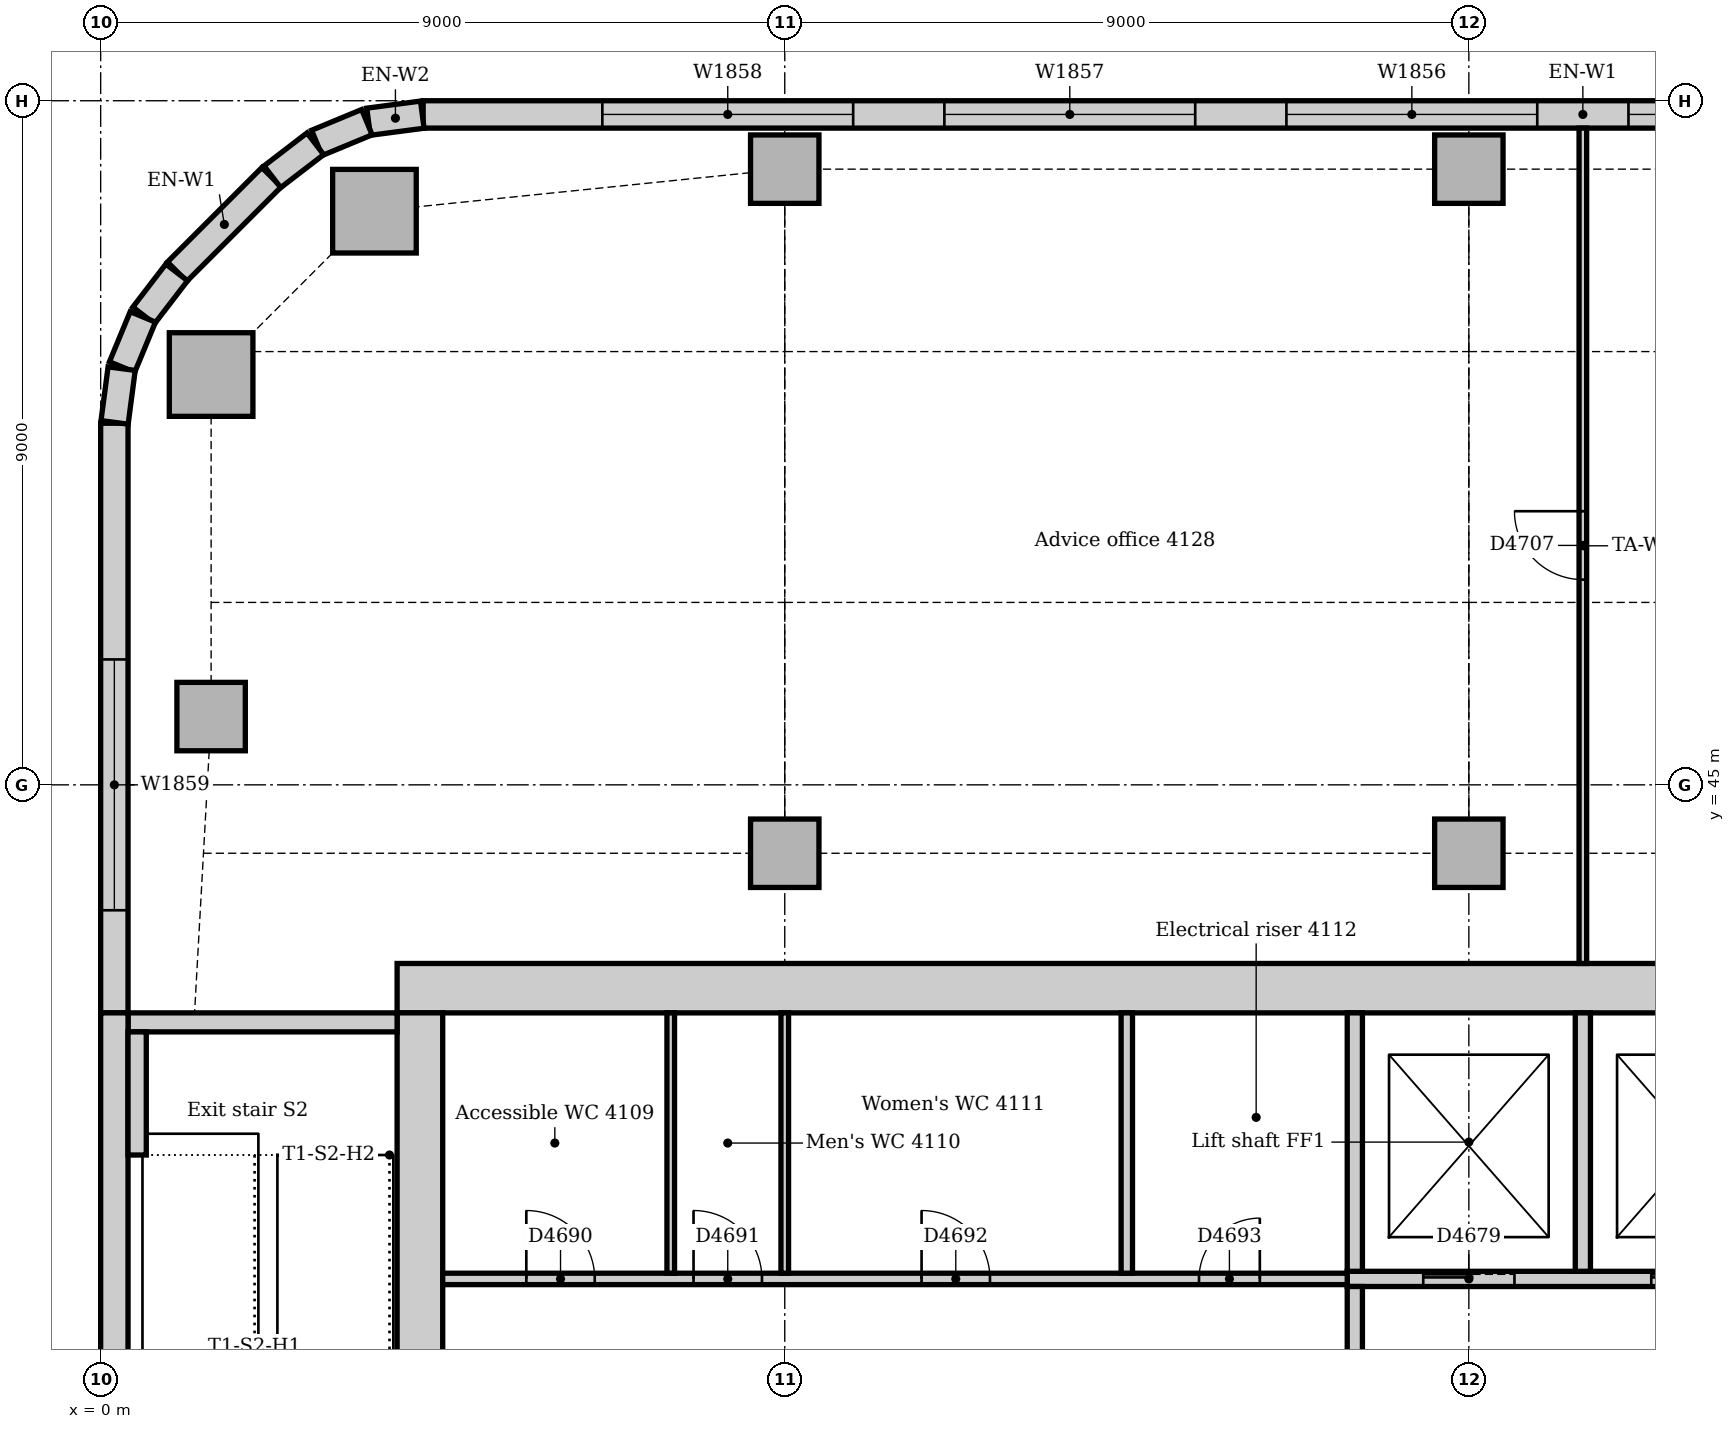
"""IFC4 building model, lengths in metres.
Left out: names, types, materials, properties, quantities, classifications, styles, units other than length and angle.
Written with IfcOpenShell. Run it as: python <this file> out.ifc"""

import sys

from ifc_helpers import new_model, si_unit, direction, frame, frame_2d, origin, origin_2d, place, context, subcontext, project, spatial, rectangle, extrude, element, fill, save


model = new_model("IFC4")
c1 = context("Model", 3, precision=1e-05, world=origin(), true_north=direction((0.0, 1.0)))
c2 = subcontext(c1, "Body", "Model", "MODEL_VIEW")
j1 = project(units=[si_unit("LENGTHUNIT", "METRE"), si_unit("PLANEANGLEUNIT", "RADIAN")], contexts=[c1])
p1 = place(None, origin())
s1 = spatial("IfcSite", under=j1, at=p1, CompositionType="ELEMENT")
p2 = place(p1, origin())
s2 = spatial("IfcBuilding", under=s1, at=p2, CompositionType="ELEMENT")
p3 = place(p2, frame((0.0, 0.0, 173.0)))
s3 = spatial("IfcBuildingStorey", under=s2, at=p3, CompositionType="ELEMENT", Elevation=173.0)
p4 = place(p3, frame((23.15, 42.325, 0.0), z_axis=(0.0, 0.0, 1.0), x_axis=(-1.0, 0.0, 0.0)))
e1 = element("IfcWall", 1, at=p4, inside=s3, PredefinedType="SOLIDWALL", context=c2, shape_type="SweptSolid", body=[
    extrude(rectangle(XDim=19.25, YDim=0.65, at=frame_2d((9.625, 0.0))), origin(), (0.0, 0.0, 1.0), 4.0),
])
p5 = place(p3, frame((4.2, 42.0, 0.0), z_axis=(0.0, 0.0, 1.0), x_axis=(0.0, -1.0, 0.0)))
e2 = element("IfcWall", 2, at=p5, inside=s3, PredefinedType="SOLIDWALL", context=c2, shape_type="SweptSolid", body=[
    extrude(rectangle(XDim=10.5, YDim=0.6, at=frame_2d((5.25, 0.0))), origin(), (0.0, 0.0, 1.0), 4.0),
])
p6 = place(p5, frame((5.3, 0.0, 0.0)))
e3 = element("IfcOpeningElement", 3, at=p6, cuts=e2, PredefinedType="OPENING", context=c2, shape_type="SweptSolid", body=[
    extrude(rectangle(XDim=1.0, YDim=2.1, at=frame_2d((0.5, 1.05))), frame((0.0, 0.31, 0.0), z_axis=(0.0, -1.0, 0.0), x_axis=(1.0, 0.0, 0.0)), (0.0, 0.0, 1.0), 0.62),
])
p7 = place(p3, frame((3.9, 41.875, 0.0), z_axis=(0.0, 0.0, 1.0), x_axis=(-1.0, 0.0, 0.0)))
e4 = element("IfcWall", 4, at=p7, inside=s3, PredefinedType="SOLIDWALL", context=c2, shape_type="SweptSolid", body=[
    extrude(rectangle(XDim=3.54, YDim=0.25, at=frame_2d((1.77, 0.0))), origin(), (0.0, 0.0, 1.0), 4.0),
])
for number, where, z_axis, x_axis in (
    (5, (3.602, 52.547, 0.0), (0.0, 0.0, 1.0), (1.0, 0.0, 0.0)),
    (6, (1.453, 50.398, 0.0), (0.0, 0.0, 1.0), (1.0, 0.0, 0.0)),
):
    element("IfcColumn", number, at=place(p3, frame(where, z_axis=z_axis, x_axis=x_axis)), inside=s3, PredefinedType="COLUMN", context=c2, shape_type="SweptSolid", body=[
        extrude(rectangle(XDim=1.1, YDim=1.1, at=origin_2d()), origin(), (0.0, 0.0, 1.0), 3.85),
    ])
for number, where, z_axis, x_axis in (
    (7, (9.0, 53.1, 0.0), (0.0, 0.0, 1.0), (1.0, 0.0, 0.0)),
    (8, (18.0, 53.1, 0.0), (0.0, 0.0, 1.0), (1.0, 0.0, 0.0)),
    (9, (1.453, 45.898, 0.0), (0.0, 0.0, 1.0), (1.0, 0.0, 0.0)),
    (10, (9.0, 44.1, 0.0), (0.0, 0.0, 1.0), (1.0, 0.0, 0.0)),
    (11, (18.0, 44.1, 0.0), (0.0, 0.0, 1.0), (1.0, 0.0, 0.0)),
):
    element("IfcColumn", number, at=place(p3, frame(where, z_axis=z_axis, x_axis=x_axis)), inside=s3, PredefinedType="COLUMN", context=c2, shape_type="SweptSolid", body=[
        extrude(rectangle(XDim=0.9, YDim=0.9, at=origin_2d()), origin(), (0.0, 0.0, 1.0), 3.85),
    ])
p8 = place(p3, frame((34.757, 53.82, 0.0), z_axis=(0.0, 0.0, 1.0), x_axis=(-1.0, 0.0, 0.0)))
e12 = element("IfcWall", 12, at=p8, inside=s3, PredefinedType="STANDARD", context=c2, shape_type="SweptSolid", body=[
    extrude(rectangle(XDim=30.515, YDim=0.36, at=frame_2d((15.257, 0.0))), origin(), (0.0, 0.0, 1.0), 3.85),
])
p9 = place(p8, frame((2.357, 0.0, 0.9)))
e13 = element("IfcOpeningElement", 13, at=p9, cuts=e12, PredefinedType="OPENING", context=c2, shape_type="SweptSolid", body=[
    extrude(rectangle(XDim=3.3, YDim=1.6, at=frame_2d((1.65, 0.8))), frame((0.0, 0.19, 0.0), z_axis=(0.0, -1.0, 0.0), x_axis=(1.0, 0.0, 0.0)), (0.0, 0.0, 1.0), 0.38),
])
p10 = place(p8, frame((6.857, 0.0, 0.9)))
e14 = element("IfcOpeningElement", 14, at=p10, cuts=e12, PredefinedType="OPENING", context=c2, shape_type="SweptSolid", body=[
    extrude(rectangle(XDim=3.3, YDim=1.6, at=frame_2d((1.65, 0.8))), frame((0.0, 0.19, 0.0), z_axis=(0.0, -1.0, 0.0), x_axis=(1.0, 0.0, 0.0)), (0.0, 0.0, 1.0), 0.38),
])
p11 = place(p8, frame((11.357, 0.0, 0.9)))
e15 = element("IfcOpeningElement", 15, at=p11, cuts=e12, PredefinedType="OPENING", context=c2, shape_type="SweptSolid", body=[
    extrude(rectangle(XDim=3.3, YDim=1.6, at=frame_2d((1.65, 0.8))), frame((0.0, 0.19, 0.0), z_axis=(0.0, -1.0, 0.0), x_axis=(1.0, 0.0, 0.0)), (0.0, 0.0, 1.0), 0.38),
])
p12 = place(p8, frame((15.857, 0.0, 0.9)))
e16 = element("IfcOpeningElement", 16, at=p12, cuts=e12, PredefinedType="OPENING", context=c2, shape_type="SweptSolid", body=[
    extrude(rectangle(XDim=3.3, YDim=1.6, at=frame_2d((1.65, 0.8))), frame((0.0, 0.19, 0.0), z_axis=(0.0, -1.0, 0.0), x_axis=(1.0, 0.0, 0.0)), (0.0, 0.0, 1.0), 0.38),
])
p13 = place(p8, frame((20.357, 0.0, 0.9)))
e17 = element("IfcOpeningElement", 17, at=p13, cuts=e12, PredefinedType="OPENING", context=c2, shape_type="SweptSolid", body=[
    extrude(rectangle(XDim=3.3, YDim=1.6, at=frame_2d((1.65, 0.8))), frame((0.0, 0.19, 0.0), z_axis=(0.0, -1.0, 0.0), x_axis=(1.0, 0.0, 0.0)), (0.0, 0.0, 1.0), 0.38),
])
p14 = place(p8, frame((24.857, 0.0, 0.9)))
e18 = element("IfcOpeningElement", 18, at=p14, cuts=e12, PredefinedType="OPENING", context=c2, shape_type="SweptSolid", body=[
    extrude(rectangle(XDim=3.3, YDim=1.6, at=frame_2d((1.65, 0.8))), frame((0.0, 0.19, 0.0), z_axis=(0.0, -1.0, 0.0), x_axis=(1.0, 0.0, 0.0)), (0.0, 0.0, 1.0), 0.38),
])
p15 = place(p3, frame((2.249, 52.994, 0.0), z_axis=(0.0, 0.0, 1.0), x_axis=(-0.707106781187, -0.707106781187, 0.0)))
e19 = element("IfcWall", 19, at=p15, inside=s3, PredefinedType="STANDARD", context=c2, shape_type="SweptSolid", body=[
    extrude(rectangle(XDim=1.757, YDim=0.36, at=frame_2d((0.879, 0.0))), origin(), (0.0, 0.0, 1.0), 3.85),
])
p16 = place(p3, frame((0.18, 49.757, 0.0), z_axis=(0.0, 0.0, 1.0), x_axis=(0.0, -1.0, 0.0)))
e20 = element("IfcWall", 20, at=p16, inside=s3, PredefinedType="STANDARD", context=c2, shape_type="SweptSolid", body=[
    extrude(rectangle(XDim=7.757, YDim=0.36, at=frame_2d((3.879, 0.0))), origin(), (0.0, 0.0, 1.0), 3.85),
])
p17 = place(p16, frame((3.107, 0.0, 0.9)))
e21 = element("IfcOpeningElement", 21, at=p17, cuts=e20, PredefinedType="OPENING", context=c2, shape_type="SweptSolid", body=[
    extrude(rectangle(XDim=3.3, YDim=1.6, at=frame_2d((1.65, 0.8))), frame((0.0, 0.19, 0.0), z_axis=(0.0, -1.0, 0.0), x_axis=(1.0, 0.0, 0.0)), (0.0, 0.0, 1.0), 0.38),
])
p18 = place(p3, frame((0.18, 42.0, 0.0), z_axis=(0.0, 0.0, 1.0), x_axis=(0.0, -1.0, 0.0)))
e22 = element("IfcWall", 22, at=p18, inside=s3, PredefinedType="STANDARD", context=c2, shape_type="SweptSolid", body=[
    extrude(rectangle(XDim=6.75, YDim=0.36, at=frame_2d((3.375, 0.0))), origin(), (0.0, 0.0, 1.0), 3.85),
])
for number, where, z_axis, x_axis in (
    (23, (4.231, 53.817, 0.0), (0.0, 0.0, 1.0), (-0.991, -0.131, 0.0)),
    (24, (3.503, 53.718, 0.0), (0.0, 0.0, 1.0), (-0.924, -0.383, 0.0)),
):
    element("IfcWall", number, at=place(p3, frame(where, z_axis=z_axis, x_axis=x_axis)), inside=s3, PredefinedType="STANDARD", context=c2, shape_type="SweptSolid", body=[
        extrude(rectangle(XDim=0.713, YDim=0.36, at=frame_2d((0.356, 0.0))), origin(), (0.0, 0.0, 1.0), 3.85),
    ])
for number, where, z_axis, x_axis in (
    (25, (2.825, 53.434, 0.0), (0.0, 0.0, 1.0), (-0.793, -0.609, 0.0)),
    (26, (1.0, 51.741, 0.0), (0.0, 0.0, 1.0), (-0.609, -0.793, 0.0)),
):
    element("IfcWall", number, at=place(p3, frame(where, z_axis=z_axis, x_axis=x_axis)), inside=s3, PredefinedType="STANDARD", context=c2, shape_type="SweptSolid", body=[
        extrude(rectangle(XDim=0.713, YDim=0.36, at=frame_2d((0.357, 0.0))), origin(), (0.0, 0.0, 1.0), 3.85),
    ])
for number, where, z_axis, x_axis in (
    (27, (0.555, 51.156, 0.0), (0.0, 0.0, 1.0), (-0.383, -0.924, 0.0)),
    (28, (0.276, 50.476, 0.0), (0.0, 0.0, 1.0), (-0.131, -0.991, 0.0)),
):
    element("IfcWall", number, at=place(p3, frame(where, z_axis=z_axis, x_axis=x_axis)), inside=s3, PredefinedType="STANDARD", context=c2, shape_type="SweptSolid", body=[
        extrude(rectangle(XDim=0.713, YDim=0.36, at=frame_2d((0.356, 0.0))), origin(), (0.0, 0.0, 1.0), 3.85),
    ])
p19 = place(p3, frame((0.48, 40.13, 0.0), z_axis=(0.0, 0.0, 1.0), x_axis=(0.0, 1.0, 0.0)))
e29 = element("IfcWall", 29, at=p19, inside=s3, PredefinedType="STANDARD", context=c2, shape_type="SweptSolid", body=[
    extrude(rectangle(XDim=1.62, YDim=0.24, at=frame_2d((0.81, 0.0))), origin(), (0.0, 0.0, 1.0), 4.0),
])
p20 = place(p3, frame((16.4, 38.5, 0.0), z_axis=(0.0, 0.0, 1.0), x_axis=(1.0, 0.0, 0.0)))
e30 = element("IfcWall", 30, at=p20, inside=s3, PredefinedType="PARTITIONING", context=c2, shape_type="SweptSolid", body=[
    extrude(rectangle(XDim=6.1, YDim=0.2, at=frame_2d((3.05, 0.0))), origin(), (0.0, 0.0, 1.0), 3.85),
])
p21 = place(p20, frame((1.0, 0.0, 0.0)))
e31 = element("IfcOpeningElement", 31, at=p21, cuts=e30, PredefinedType="OPENING", context=c2, shape_type="SweptSolid", body=[
    extrude(rectangle(XDim=1.2, YDim=2.1, at=frame_2d((0.6, 1.05))), frame((0.0, 0.11, 0.0), z_axis=(0.0, -1.0, 0.0), x_axis=(1.0, 0.0, 0.0)), (0.0, 0.0, 1.0), 0.22),
])
p22 = place(p20, frame((4.0, 0.0, 0.0)))
e32 = element("IfcOpeningElement", 32, at=p22, cuts=e30, PredefinedType="OPENING", context=c2, shape_type="SweptSolid", body=[
    extrude(rectangle(XDim=1.2, YDim=2.1, at=frame_2d((0.6, 1.05))), frame((0.0, 0.11, 0.0), z_axis=(0.0, -1.0, 0.0), x_axis=(1.0, 0.0, 0.0)), (0.0, 0.0, 1.0), 0.22),
])
p23 = place(p3, frame((16.5, 35.85, 0.0), z_axis=(0.0, 0.0, 1.0), x_axis=(0.0, 1.0, 0.0)))
e33 = element("IfcWall", 33, at=p23, inside=s3, PredefinedType="PARTITIONING", context=c2, shape_type="SweptSolid", body=[
    extrude(rectangle(XDim=2.55, YDim=0.2, at=frame_2d((1.275, 0.0))), origin(), (0.0, 0.0, 1.0), 3.85),
])
for number, where, z_axis, x_axis in (
    (34, (16.5, 38.6, 0.0), (0.0, 0.0, 1.0), (0.0, 1.0, 0.0)),
    (35, (19.5, 38.6, 0.0), (0.0, 0.0, 1.0), (0.0, 1.0, 0.0)),
):
    element("IfcWall", number, at=place(p3, frame(where, z_axis=z_axis, x_axis=x_axis)), inside=s3, PredefinedType="PARTITIONING", context=c2, shape_type="SweptSolid", body=[
        extrude(rectangle(XDim=3.4, YDim=0.2, at=frame_2d((1.7, 0.0))), origin(), (0.0, 0.0, 1.0), 3.85),
    ])
p24 = place(p3, frame((4.5, 38.5, 0.0), z_axis=(0.0, 0.0, 1.0), x_axis=(1.0, 0.0, 0.0)))
e36 = element("IfcWall", 36, at=p24, inside=s3, PredefinedType="PARTITIONING", context=c2, shape_type="SweptSolid", body=[
    extrude(rectangle(XDim=11.9, YDim=0.15, at=frame_2d((5.95, 0.0))), origin(), (0.0, 0.0, 1.0), 3.85),
])
p25 = place(p24, frame((1.1, 0.0, 0.0)))
e37 = element("IfcOpeningElement", 37, at=p25, cuts=e36, PredefinedType="OPENING", context=c2, shape_type="SweptSolid", body=[
    extrude(rectangle(XDim=0.9, YDim=2.1, at=frame_2d((0.45, 1.05))), frame((0.0, 0.085, 0.0), z_axis=(0.0, -1.0, 0.0), x_axis=(1.0, 0.0, 0.0)), (0.0, 0.0, 1.0), 0.17),
])
p26 = place(p24, frame((3.3, 0.0, 0.0)))
e38 = element("IfcOpeningElement", 38, at=p26, cuts=e36, PredefinedType="OPENING", context=c2, shape_type="SweptSolid", body=[
    extrude(rectangle(XDim=0.9, YDim=2.1, at=frame_2d((0.45, 1.05))), frame((0.0, 0.085, 0.0), z_axis=(0.0, -1.0, 0.0), x_axis=(1.0, 0.0, 0.0)), (0.0, 0.0, 1.0), 0.17),
])
p27 = place(p24, frame((6.3, 0.0, 0.0)))
e39 = element("IfcOpeningElement", 39, at=p27, cuts=e36, PredefinedType="OPENING", context=c2, shape_type="SweptSolid", body=[
    extrude(rectangle(XDim=0.9, YDim=2.1, at=frame_2d((0.45, 1.05))), frame((0.0, 0.085, 0.0), z_axis=(0.0, -1.0, 0.0), x_axis=(1.0, 0.0, 0.0)), (0.0, 0.0, 1.0), 0.17),
])
p28 = place(p24, frame((9.95, 0.0, 0.0)))
e40 = element("IfcOpeningElement", 40, at=p28, cuts=e36, PredefinedType="OPENING", context=c2, shape_type="SweptSolid", body=[
    extrude(rectangle(XDim=0.8, YDim=2.1, at=frame_2d((0.4, 1.05))), frame((0.0, 0.085, 0.0), z_axis=(0.0, -1.0, 0.0), x_axis=(1.0, 0.0, 0.0)), (0.0, 0.0, 1.0), 0.17),
])
p29 = place(p3, frame((13.5, 38.575, 0.0), z_axis=(0.0, 0.0, 1.0), x_axis=(0.0, 1.0, 0.0)))
e41 = element("IfcWall", 41, at=p29, inside=s3, PredefinedType="PARTITIONING", context=c2, shape_type="SweptSolid", body=[
    extrude(rectangle(XDim=3.425, YDim=0.15, at=frame_2d((1.712, 0.0))), origin(), (0.0, 0.0, 1.0), 3.85),
])
p30 = place(p3, frame((19.5, 42.65, 0.0), z_axis=(0.0, 0.0, 1.0), x_axis=(0.0, 1.0, 0.0)))
e42 = element("IfcWall", 42, at=p30, inside=s3, PredefinedType="PARTITIONING", context=c2, shape_type="SweptSolid", body=[
    extrude(rectangle(XDim=10.99, YDim=0.1, at=frame_2d((5.495, 0.0))), origin(), (0.0, 0.0, 1.0), 3.85),
])
p31 = place(p30, frame((5.05, 0.0, 0.0)))
e43 = element("IfcOpeningElement", 43, at=p31, cuts=e42, PredefinedType="OPENING", context=c2, shape_type="SweptSolid", body=[
    extrude(rectangle(XDim=0.9, YDim=2.1, at=frame_2d((0.45, 1.05))), frame((0.0, 0.06, 0.0), z_axis=(0.0, -1.0, 0.0), x_axis=(1.0, 0.0, 0.0)), (0.0, 0.0, 1.0), 0.12),
])
for number, where, z_axis, x_axis in (
    (44, (7.5, 38.575, 0.0), (0.0, 0.0, 1.0), (0.0, 1.0, 0.0)),
    (45, (9.0, 38.575, 0.0), (0.0, 0.0, 1.0), (0.0, 1.0, 0.0)),
):
    element("IfcWall", number, at=place(p3, frame(where, z_axis=z_axis, x_axis=x_axis)), inside=s3, PredefinedType="PARTITIONING", context=c2, shape_type="SweptSolid", body=[
        extrude(rectangle(XDim=3.425, YDim=0.1, at=frame_2d((1.712, 0.0))), origin(), (0.0, 0.0, 1.0), 3.85),
    ])
p32 = place(p11, origin())
e46 = element("IfcWindow", 46, at=p32, inside=s3, PartitioningType="SINGLE_PANEL", PredefinedType="WINDOW", context=c2, shape_type="SweptSolid", body=[
    extrude(rectangle(XDim=3.3, YDim=1.6, at=frame_2d((1.65, 0.8))), frame((0.0, 0.13, 0.0), z_axis=(0.0, -1.0, 0.0), x_axis=(1.0, 0.0, 0.0)), (0.0, 0.0, 1.0), 0.06),
])
fill(e15, e46)
p33 = place(p12, origin())
e47 = element("IfcWindow", 47, at=p33, inside=s3, PartitioningType="SINGLE_PANEL", PredefinedType="WINDOW", context=c2, shape_type="SweptSolid", body=[
    extrude(rectangle(XDim=3.3, YDim=1.6, at=frame_2d((1.65, 0.8))), frame((0.0, 0.13, 0.0), z_axis=(0.0, -1.0, 0.0), x_axis=(1.0, 0.0, 0.0)), (0.0, 0.0, 1.0), 0.06),
])
fill(e16, e47)
p34 = place(p13, origin())
e48 = element("IfcWindow", 48, at=p34, inside=s3, PartitioningType="SINGLE_PANEL", PredefinedType="WINDOW", context=c2, shape_type="SweptSolid", body=[
    extrude(rectangle(XDim=3.3, YDim=1.6, at=frame_2d((1.65, 0.8))), frame((0.0, 0.13, 0.0), z_axis=(0.0, -1.0, 0.0), x_axis=(1.0, 0.0, 0.0)), (0.0, 0.0, 1.0), 0.06),
])
fill(e17, e48)
p35 = place(p14, origin())
e49 = element("IfcWindow", 49, at=p35, inside=s3, PartitioningType="SINGLE_PANEL", PredefinedType="WINDOW", context=c2, shape_type="SweptSolid", body=[
    extrude(rectangle(XDim=3.3, YDim=1.6, at=frame_2d((1.65, 0.8))), frame((0.0, 0.13, 0.0), z_axis=(0.0, -1.0, 0.0), x_axis=(1.0, 0.0, 0.0)), (0.0, 0.0, 1.0), 0.06),
])
fill(e18, e49)
p36 = place(p17, origin())
e50 = element("IfcWindow", 50, at=p36, inside=s3, PartitioningType="SINGLE_PANEL", PredefinedType="WINDOW", context=c2, shape_type="SweptSolid", body=[
    extrude(rectangle(XDim=3.3, YDim=1.6, at=frame_2d((1.65, 0.8))), frame((0.0, 0.13, 0.0), z_axis=(0.0, -1.0, 0.0), x_axis=(1.0, 0.0, 0.0)), (0.0, 0.0, 1.0), 0.06),
])
fill(e21, e50)
p37 = place(p21, origin())
e51 = element("IfcDoor", 51, at=p37, inside=s3, OperationType="SLIDING_TO_LEFT", PredefinedType="DOOR", context=c2, shape_type="SweptSolid", body=[
    extrude(rectangle(XDim=1.2, YDim=2.1, at=frame_2d((0.6, 1.05))), frame((0.0, 0.025, 0.0), z_axis=(0.0, -1.0, 0.0), x_axis=(1.0, 0.0, 0.0)), (0.0, 0.0, 1.0), 0.05),
])
fill(e31, e51)
p38 = place(p22, origin())
e52 = element("IfcDoor", 52, at=p38, inside=s3, OperationType="SLIDING_TO_LEFT", PredefinedType="DOOR", context=c2, shape_type="SweptSolid", body=[
    extrude(rectangle(XDim=1.2, YDim=2.1, at=frame_2d((0.6, 1.05))), frame((0.0, 0.025, 0.0), z_axis=(0.0, -1.0, 0.0), x_axis=(1.0, 0.0, 0.0)), (0.0, 0.0, 1.0), 0.05),
])
fill(e32, e52)
p39 = place(p25, origin())
e53 = element("IfcDoor", 53, at=p39, inside=s3, OperationType="SINGLE_SWING_LEFT", PredefinedType="DOOR", context=c2, shape_type="SweptSolid", body=[
    extrude(rectangle(XDim=0.9, YDim=2.1, at=frame_2d((0.45, 1.05))), frame((0.0, 0.025, 0.0), z_axis=(0.0, -1.0, 0.0), x_axis=(1.0, 0.0, 0.0)), (0.0, 0.0, 1.0), 0.05),
])
fill(e37, e53)
p40 = place(p26, origin())
e54 = element("IfcDoor", 54, at=p40, inside=s3, OperationType="SINGLE_SWING_LEFT", PredefinedType="DOOR", context=c2, shape_type="SweptSolid", body=[
    extrude(rectangle(XDim=0.9, YDim=2.1, at=frame_2d((0.45, 1.05))), frame((0.0, 0.025, 0.0), z_axis=(0.0, -1.0, 0.0), x_axis=(1.0, 0.0, 0.0)), (0.0, 0.0, 1.0), 0.05),
])
fill(e38, e54)
p41 = place(p27, origin())
e55 = element("IfcDoor", 55, at=p41, inside=s3, OperationType="SINGLE_SWING_LEFT", PredefinedType="DOOR", context=c2, shape_type="SweptSolid", body=[
    extrude(rectangle(XDim=0.9, YDim=2.1, at=frame_2d((0.45, 1.05))), frame((0.0, 0.025, 0.0), z_axis=(0.0, -1.0, 0.0), x_axis=(1.0, 0.0, 0.0)), (0.0, 0.0, 1.0), 0.05),
])
fill(e39, e55)
p42 = place(p28, origin())
e56 = element("IfcDoor", 56, at=p42, inside=s3, OperationType="SINGLE_SWING_RIGHT", PredefinedType="DOOR", context=c2, shape_type="SweptSolid", body=[
    extrude(rectangle(XDim=0.8, YDim=2.1, at=frame_2d((0.4, 1.05))), frame((0.0, 0.025, 0.0), z_axis=(0.0, -1.0, 0.0), x_axis=(1.0, 0.0, 0.0)), (0.0, 0.0, 1.0), 0.05),
])
fill(e40, e56)
p43 = place(p31, origin())
e57 = element("IfcDoor", 57, at=p43, inside=s3, OperationType="SINGLE_SWING_RIGHT", PredefinedType="DOOR", context=c2, shape_type="SweptSolid", body=[
    extrude(rectangle(XDim=0.9, YDim=2.1, at=frame_2d((0.45, 1.05))), frame((0.0, 0.025, 0.0), z_axis=(0.0, -1.0, 0.0), x_axis=(1.0, 0.0, 0.0)), (0.0, 0.0, 1.0), 0.05),
])
fill(e43, e57)
save(model, sys.argv[1])
